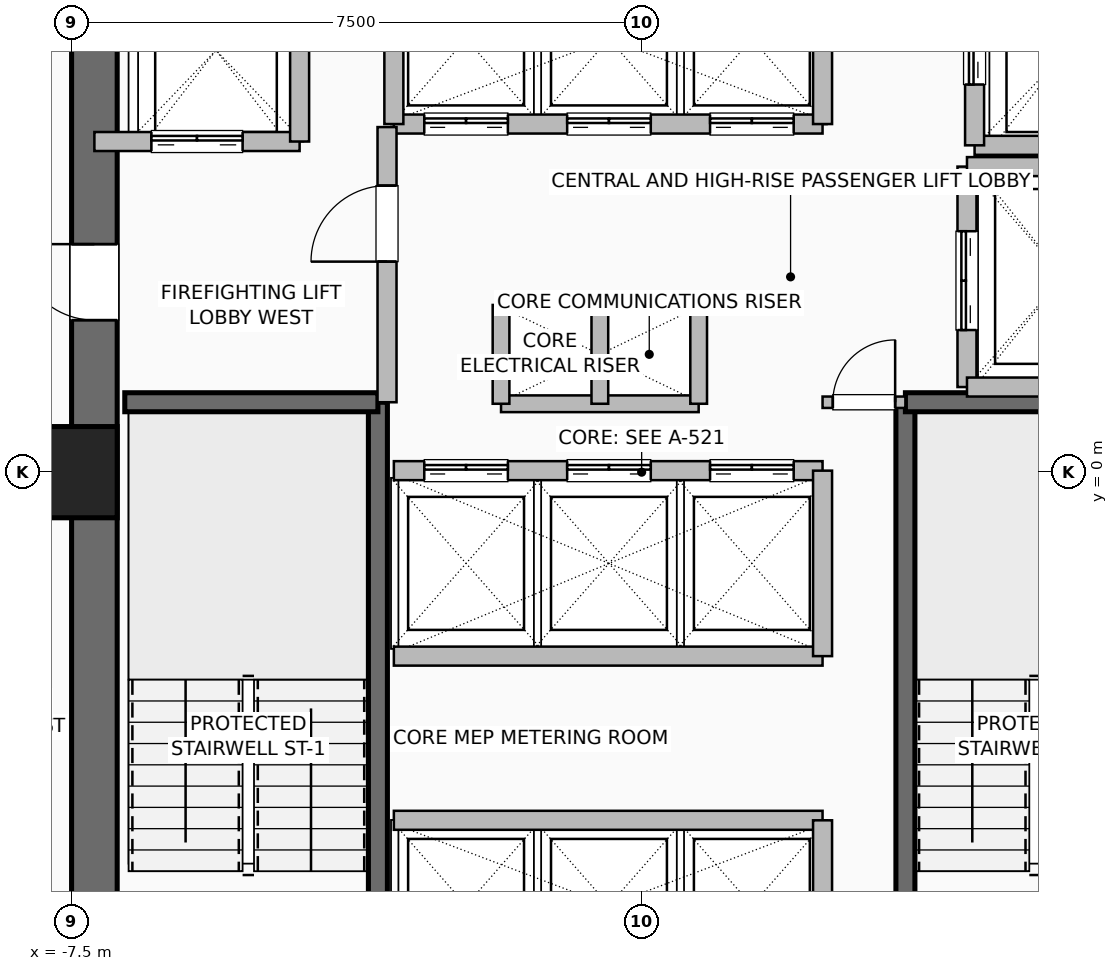
"""IFC4 building model, lengths in metres.
Left out: names, types, materials, properties, quantities, classifications, styles, units other than length and angle.
Written with IfcOpenShell. Run it as: python <this file> out.ifc"""

import sys

from ifc_helpers import new_model, si_unit, direction, frame, frame_2d, origin, origin_2d, place, context, subcontext, project, spatial, rectangle, hollow_rectangle, extrude, element, fill, save


model = new_model("IFC4")
c1 = context("Model", 3, precision=1e-05, world=origin(), true_north=direction((0.0, 1.0)))
c2 = subcontext(c1, "Body", "Model", "MODEL_VIEW")
j1 = project(units=[si_unit("LENGTHUNIT", "METRE"), si_unit("PLANEANGLEUNIT", "RADIAN")], contexts=[c1])
p1 = place(None, origin())
s1 = spatial("IfcSite", under=j1, at=p1, CompositionType="ELEMENT")
p2 = place(p1, origin())
s2 = spatial("IfcBuilding", under=s1, at=p2, CompositionType="ELEMENT")
p3 = place(p2, frame((0.0, 0.0, 79.5)))
s3 = spatial("IfcBuildingStorey", under=s2, at=p3, CompositionType="ELEMENT", Elevation=79.5)
p4 = place(p3, frame((-7.5, 0.0, 0.0), z_axis=(0.0, 0.0, 1.0), x_axis=(1.0, 0.0, 0.0)))
e1 = element("IfcColumn", 1, at=p4, inside=s3, PredefinedType="COLUMN", context=c2, shape_type="SweptSolid", body=[
    extrude(hollow_rectangle(XDim=1.2, YDim=1.2, WallThickness=0.055, at=origin_2d()), origin(), (0.0, 0.0, 1.0), 3.5),
])
p5 = place(p3, frame((-7.2, -7.5, 0.0), z_axis=(0.0, 0.0, 1.0), x_axis=(0.0, 1.0, 0.0)))
e2 = element("IfcWall", 2, at=p5, inside=s3, PredefinedType="SHEAR", context=c2, shape_type="SweptSolid", body=[
    extrude(rectangle(XDim=15.0, YDim=0.6, at=frame_2d((7.5, 0.0))), origin(), (0.0, 0.0, 1.0), 3.15),
])
p6 = place(p5, frame((9.5, 0.0, 0.0)))
e3 = element("IfcOpeningElement", 3, at=p6, cuts=e2, PredefinedType="OPENING", context=c2, shape_type="SweptSolid", body=[
    extrude(rectangle(XDim=1.0, YDim=2.08, at=frame_2d((0.5, 1.04))), frame((0.0, 0.31, 0.0), z_axis=(0.0, -1.0, 0.0), x_axis=(1.0, 0.0, 0.0)), (0.0, 0.0, 1.0), 0.62),
])
p7 = place(p3, frame((-3.47, -6.8, 0.0), z_axis=(0.0, 0.0, 1.0), x_axis=(0.0, 1.0, 0.0)))
e4 = element("IfcWall", 4, at=p7, inside=s3, PredefinedType="SHEAR", context=c2, shape_type="SweptSolid", body=[
    extrude(rectangle(XDim=7.72, YDim=0.25, at=frame_2d((3.86, 0.0))), origin(), (0.0, 0.0, 1.0), 3.15),
])
p8 = place(p3, frame((-6.8, 0.92, 0.0), z_axis=(0.0, 0.0, 1.0), x_axis=(1.0, 0.0, 0.0)))
e5 = element("IfcWall", 5, at=p8, inside=s3, PredefinedType="SHEAR", context=c2, shape_type="SweptSolid", body=[
    extrude(rectangle(XDim=3.33, YDim=0.25, at=frame_2d((1.665, 0.0))), origin(), (0.0, 0.0, 1.0), 3.15),
])
p9 = place(p3, frame((3.47, -6.8, 0.0), z_axis=(0.0, 0.0, 1.0), x_axis=(0.0, 1.0, 0.0)))
e6 = element("IfcWall", 6, at=p9, inside=s3, PredefinedType="SHEAR", context=c2, shape_type="SweptSolid", body=[
    extrude(rectangle(XDim=7.72, YDim=0.25, at=frame_2d((3.86, 0.0))), origin(), (0.0, 0.0, 1.0), 3.15),
])
p10 = place(p3, frame((3.47, 0.92, 0.0), z_axis=(0.0, 0.0, 1.0), x_axis=(1.0, 0.0, 0.0)))
e7 = element("IfcWall", 7, at=p10, inside=s3, PredefinedType="SHEAR", context=c2, shape_type="SweptSolid", body=[
    extrude(rectangle(XDim=3.33, YDim=0.25, at=frame_2d((1.665, 0.0))), origin(), (0.0, 0.0, 1.0), 3.15),
])
for number, where, z_axis, x_axis in (
    (8, (-1.85, 2.2, 0.0), (0.0, 0.0, 1.0), (1.0, 0.0, 0.0)),
    (9, (-1.85, 0.9, 0.0), (0.0, 0.0, 1.0), (1.0, 0.0, 0.0)),
):
    element("IfcWall", number, at=place(p3, frame(where, z_axis=z_axis, x_axis=x_axis)), inside=s3, PredefinedType="PARTITIONING", context=c2, shape_type="SweptSolid", body=[
        extrude(rectangle(XDim=2.6, YDim=0.22, at=frame_2d((1.3, 0.0))), origin(), (0.0, 0.0, 1.0), 3.15),
    ])
for number, where, z_axis, x_axis in (
    (10, (-0.55, 0.9, 0.0), (0.0, 0.0, 1.0), (0.0, 1.0, 0.0)),
    (11, (0.75, 0.9, 0.0), (0.0, 0.0, 1.0), (0.0, 1.0, 0.0)),
    (12, (-1.85, 0.9, 0.0), (0.0, 0.0, 1.0), (0.0, 1.0, 0.0)),
):
    element("IfcWall", number, at=place(p3, frame(where, z_axis=z_axis, x_axis=x_axis)), inside=s3, PredefinedType="PARTITIONING", context=c2, shape_type="SweptSolid", body=[
        extrude(rectangle(XDim=1.3, YDim=0.22, at=frame_2d((0.65, 0.0))), origin(), (0.0, 0.0, 1.0), 3.15),
    ])
p11 = place(p3, frame((-3.26, -4.58, 0.0), z_axis=(0.0, 0.0, 1.0), x_axis=(1.0, 0.0, 0.0)))
e13 = element("IfcWall", 13, at=p11, inside=s3, PredefinedType="SHEAR", context=c2, shape_type="SweptSolid", body=[
    extrude(rectangle(XDim=5.64, YDim=0.25, at=frame_2d((2.82, 0.0))), origin(), (0.0, 0.0, 1.0), 3.15),
])
p12 = place(p3, frame((2.38, -6.8, 0.0), z_axis=(0.0, 0.0, 1.0), x_axis=(0.0, 1.0, 0.0)))
e14 = element("IfcWall", 14, at=p12, inside=s3, PredefinedType="SHEAR", context=c2, shape_type="SweptSolid", body=[
    extrude(rectangle(XDim=2.22, YDim=0.25, at=frame_2d((1.11, 0.0))), origin(), (0.0, 0.0, 1.0), 3.15),
])
p13 = place(p3, frame((-3.26, 0.02, 0.0), z_axis=(0.0, 0.0, 1.0), x_axis=(1.0, 0.0, 0.0)))
e15 = element("IfcWall", 15, at=p13, inside=s3, PredefinedType="SHEAR", context=c2, shape_type="SweptSolid", body=[
    extrude(rectangle(XDim=5.64, YDim=0.25, at=frame_2d((2.82, 0.0))), origin(), (0.0, 0.0, 1.0), 3.15),
])
p14 = place(p13, frame((0.4, 0.0, 0.0)))
e16 = element("IfcOpeningElement", 16, at=p14, cuts=e15, PredefinedType="OPENING", context=c2, shape_type="SweptSolid", body=[
    extrude(rectangle(XDim=1.1, YDim=2.2, at=frame_2d((0.55, 1.1))), frame((0.0, 0.135, 0.0), z_axis=(0.0, -1.0, 0.0), x_axis=(1.0, 0.0, 0.0)), (0.0, 0.0, 1.0), 0.27),
])
p15 = place(p13, frame((2.28, 0.0, 0.0)))
e17 = element("IfcOpeningElement", 17, at=p15, cuts=e15, PredefinedType="OPENING", context=c2, shape_type="SweptSolid", body=[
    extrude(rectangle(XDim=1.1, YDim=2.2, at=frame_2d((0.55, 1.1))), frame((0.0, 0.135, 0.0), z_axis=(0.0, -1.0, 0.0), x_axis=(1.0, 0.0, 0.0)), (0.0, 0.0, 1.0), 0.27),
])
p16 = place(p13, frame((4.16, 0.0, 0.0)))
e18 = element("IfcOpeningElement", 18, at=p16, cuts=e15, PredefinedType="OPENING", context=c2, shape_type="SweptSolid", body=[
    extrude(rectangle(XDim=1.1, YDim=2.2, at=frame_2d((0.55, 1.1))), frame((0.0, 0.135, 0.0), z_axis=(0.0, -1.0, 0.0), x_axis=(1.0, 0.0, 0.0)), (0.0, 0.0, 1.0), 0.27),
])
p17 = place(p3, frame((-3.26, -2.42, 0.0), z_axis=(0.0, 0.0, 1.0), x_axis=(1.0, 0.0, 0.0)))
e19 = element("IfcWall", 19, at=p17, inside=s3, PredefinedType="SHEAR", context=c2, shape_type="SweptSolid", body=[
    extrude(rectangle(XDim=5.64, YDim=0.25, at=frame_2d((2.82, 0.0))), origin(), (0.0, 0.0, 1.0), 3.15),
])
p18 = place(p3, frame((2.38, -2.42, 0.0), z_axis=(0.0, 0.0, 1.0), x_axis=(0.0, 1.0, 0.0)))
e20 = element("IfcWall", 20, at=p18, inside=s3, PredefinedType="SHEAR", context=c2, shape_type="SweptSolid", body=[
    extrude(rectangle(XDim=2.44, YDim=0.25, at=frame_2d((1.22, 0.0))), origin(), (0.0, 0.0, 1.0), 3.15),
])
p19 = place(p3, frame((-3.26, 4.58, 0.0), z_axis=(0.0, 0.0, 1.0), x_axis=(1.0, 0.0, 0.0)))
e21 = element("IfcWall", 21, at=p19, inside=s3, PredefinedType="SHEAR", context=c2, shape_type="SweptSolid", body=[
    extrude(rectangle(XDim=5.64, YDim=0.25, at=frame_2d((2.82, 0.0))), origin(), (0.0, 0.0, 1.0), 3.15),
])
p20 = place(p19, frame((0.4, 0.0, 0.0)))
e22 = element("IfcOpeningElement", 22, at=p20, cuts=e21, PredefinedType="OPENING", context=c2, shape_type="SweptSolid", body=[
    extrude(rectangle(XDim=1.1, YDim=2.2, at=frame_2d((0.55, 1.1))), frame((0.0, 0.135, 0.0), z_axis=(0.0, -1.0, 0.0), x_axis=(1.0, 0.0, 0.0)), (0.0, 0.0, 1.0), 0.27),
])
p21 = place(p19, frame((2.28, 0.0, 0.0)))
e23 = element("IfcOpeningElement", 23, at=p21, cuts=e21, PredefinedType="OPENING", context=c2, shape_type="SweptSolid", body=[
    extrude(rectangle(XDim=1.1, YDim=2.2, at=frame_2d((0.55, 1.1))), frame((0.0, 0.135, 0.0), z_axis=(0.0, -1.0, 0.0), x_axis=(1.0, 0.0, 0.0)), (0.0, 0.0, 1.0), 0.27),
])
p22 = place(p19, frame((4.16, 0.0, 0.0)))
e24 = element("IfcOpeningElement", 24, at=p22, cuts=e21, PredefinedType="OPENING", context=c2, shape_type="SweptSolid", body=[
    extrude(rectangle(XDim=1.1, YDim=2.2, at=frame_2d((0.55, 1.1))), frame((0.0, 0.135, 0.0), z_axis=(0.0, -1.0, 0.0), x_axis=(1.0, 0.0, 0.0)), (0.0, 0.0, 1.0), 0.27),
])
for number, where, z_axis, x_axis in (
    (25, (-3.26, 4.58, 0.0), (0.0, 0.0, 1.0), (0.0, 1.0, 0.0)),
    (26, (2.38, 4.58, 0.0), (0.0, 0.0, 1.0), (0.0, 1.0, 0.0)),
):
    element("IfcWall", number, at=place(p3, frame(where, z_axis=z_axis, x_axis=x_axis)), inside=s3, PredefinedType="SHEAR", context=c2, shape_type="SweptSolid", body=[
        extrude(rectangle(XDim=2.22, YDim=0.25, at=frame_2d((1.11, 0.0))), origin(), (0.0, 0.0, 1.0), 3.15),
    ])
p23 = place(p3, frame((-7.2, 4.35, 0.0), z_axis=(0.0, 0.0, 1.0), x_axis=(1.0, 0.0, 0.0)))
e27 = element("IfcWall", 27, at=p23, inside=s3, PredefinedType="SHEAR", context=c2, shape_type="SweptSolid", body=[
    extrude(rectangle(XDim=2.7, YDim=0.25, at=frame_2d((1.35, 0.0))), origin(), (0.0, 0.0, 1.0), 3.15),
])
p24 = place(p23, frame((0.75, 0.0, 0.0)))
e28 = element("IfcOpeningElement", 28, at=p24, cuts=e27, PredefinedType="OPENING", context=c2, shape_type="SweptSolid", body=[
    extrude(rectangle(XDim=1.2, YDim=2.2, at=frame_2d((0.6, 1.1))), frame((0.0, 0.135, 0.0), z_axis=(0.0, -1.0, 0.0), x_axis=(1.0, 0.0, 0.0)), (0.0, 0.0, 1.0), 0.27),
])
p25 = place(p3, frame((-4.5, 4.35, 0.0), z_axis=(0.0, 0.0, 1.0), x_axis=(0.0, 1.0, 0.0)))
e29 = element("IfcWall", 29, at=p25, inside=s3, PredefinedType="SHEAR", context=c2, shape_type="SweptSolid", body=[
    extrude(rectangle(XDim=2.85, YDim=0.25, at=frame_2d((1.425, 0.0))), origin(), (0.0, 0.0, 1.0), 3.15),
])
p26 = place(p3, frame((4.38, 4.3, 0.0), z_axis=(0.0, 0.0, 1.0), x_axis=(1.0, 0.0, 0.0)))
e30 = element("IfcWall", 30, at=p26, inside=s3, PredefinedType="SHEAR", context=c2, shape_type="SweptSolid", body=[
    extrude(rectangle(XDim=2.42, YDim=0.25, at=frame_2d((1.21, 0.0))), origin(), (0.0, 0.0, 1.0), 3.15),
])
p27 = place(p3, frame((4.38, 4.3, 0.0), z_axis=(0.0, 0.0, 1.0), x_axis=(0.0, 1.0, 0.0)))
e31 = element("IfcWall", 31, at=p27, inside=s3, PredefinedType="SHEAR", context=c2, shape_type="SweptSolid", body=[
    extrude(rectangle(XDim=2.5, YDim=0.25, at=frame_2d((1.25, 0.0))), origin(), (0.0, 0.0, 1.0), 3.15),
])
p28 = place(p27, frame((0.8, 0.0, 0.0)))
e32 = element("IfcOpeningElement", 32, at=p28, cuts=e31, PredefinedType="OPENING", context=c2, shape_type="SweptSolid", body=[
    extrude(rectangle(XDim=1.2, YDim=2.2, at=frame_2d((0.6, 1.1))), frame((0.0, 0.135, 0.0), z_axis=(0.0, -1.0, 0.0), x_axis=(1.0, 0.0, 0.0)), (0.0, 0.0, 1.0), 0.27),
])
p29 = place(p3, frame((4.28, 1.12, 0.0), z_axis=(0.0, 0.0, 1.0), x_axis=(0.0, 1.0, 0.0)))
e33 = element("IfcWall", 33, at=p29, inside=s3, PredefinedType="SHEAR", context=c2, shape_type="SweptSolid", body=[
    extrude(rectangle(XDim=2.9, YDim=0.25, at=frame_2d((1.45, 0.0))), origin(), (0.0, 0.0, 1.0), 3.15),
])
p30 = place(p29, frame((0.75, 0.0, 0.0)))
e34 = element("IfcOpeningElement", 34, at=p30, cuts=e33, PredefinedType="OPENING", context=c2, shape_type="SweptSolid", body=[
    extrude(rectangle(XDim=1.3, YDim=2.3, at=frame_2d((0.65, 1.15))), frame((0.0, 0.135, 0.0), z_axis=(0.0, -1.0, 0.0), x_axis=(1.0, 0.0, 0.0)), (0.0, 0.0, 1.0), 0.27),
])
for number, where, z_axis, x_axis in (
    (35, (4.28, 1.12, 0.0), (0.0, 0.0, 1.0), (1.0, 0.0, 0.0)),
    (36, (4.28, 4.02, 0.0), (0.0, 0.0, 1.0), (1.0, 0.0, 0.0)),
):
    element("IfcWall", number, at=place(p3, frame(where, z_axis=z_axis, x_axis=x_axis)), inside=s3, PredefinedType="SHEAR", context=c2, shape_type="SweptSolid", body=[
        extrude(rectangle(XDim=2.52, YDim=0.25, at=frame_2d((1.26, 0.0))), origin(), (0.0, 0.0, 1.0), 3.15),
    ])
p31 = place(p3, frame((-3.35, 0.92, 0.0), z_axis=(0.0, 0.0, 1.0), x_axis=(0.0, 1.0, 0.0)))
e37 = element("IfcWall", 37, at=p31, inside=s3, PredefinedType="SHEAR", context=c2, shape_type="SweptSolid", body=[
    extrude(rectangle(XDim=3.62, YDim=0.25, at=frame_2d((1.81, 0.0))), origin(), (0.0, 0.0, 1.0), 3.15),
])
p32 = place(p31, frame((1.85, 0.0, 0.0)))
e38 = element("IfcOpeningElement", 38, at=p32, cuts=e37, PredefinedType="OPENING", context=c2, shape_type="SweptSolid", body=[
    extrude(rectangle(XDim=1.0, YDim=2.08, at=frame_2d((0.5, 1.04))), frame((0.0, 0.135, 0.0), z_axis=(0.0, -1.0, 0.0), x_axis=(1.0, 0.0, 0.0)), (0.0, 0.0, 1.0), 0.27),
])
p33 = place(p3, frame((2.38, 0.92, 0.0), z_axis=(0.0, 0.0, 1.0), x_axis=(1.0, 0.0, 0.0)))
e39 = element("IfcWall", 39, at=p33, inside=s3, PredefinedType="PARTITIONING", context=c2, shape_type="SweptSolid", body=[
    extrude(rectangle(XDim=1.09, YDim=0.15, at=frame_2d((0.545, 0.0))), origin(), (0.0, 0.0, 1.0), 3.15),
])
p34 = place(p33, frame((0.135, 0.0, 0.0)))
e40 = element("IfcOpeningElement", 40, at=p34, cuts=e39, PredefinedType="OPENING", context=c2, shape_type="SweptSolid", body=[
    extrude(rectangle(XDim=0.82, YDim=2.05, at=frame_2d((0.41, 1.025))), frame((0.0, 0.085, 0.0), z_axis=(0.0, -1.0, 0.0), x_axis=(1.0, 0.0, 0.0)), (0.0, 0.0, 1.0), 0.17),
])
p35 = place(p6, origin())
e41 = element("IfcDoor", 41, at=p35, inside=s3, OperationType="SINGLE_SWING_RIGHT", PredefinedType="DOOR", context=c2, shape_type="SweptSolid", body=[
    extrude(rectangle(XDim=1.0, YDim=2.08, at=frame_2d((0.5, 1.04))), frame((0.0, 0.025, 0.0), z_axis=(0.0, -1.0, 0.0), x_axis=(1.0, 0.0, 0.0)), (0.0, 0.0, 1.0), 0.05),
])
fill(e3, e41)
p36 = place(p14, origin())
e42 = element("IfcDoor", 42, at=p36, inside=s3, OperationType="DOUBLE_DOOR_SLIDING", PredefinedType="DOOR", context=c2, shape_type="SweptSolid", body=[
    extrude(rectangle(XDim=1.1, YDim=2.2, at=frame_2d((0.55, 1.1))), frame((0.0, 0.025, 0.0), z_axis=(0.0, -1.0, 0.0), x_axis=(1.0, 0.0, 0.0)), (0.0, 0.0, 1.0), 0.05),
])
fill(e16, e42)
p37 = place(p15, origin())
e43 = element("IfcDoor", 43, at=p37, inside=s3, OperationType="DOUBLE_DOOR_SLIDING", PredefinedType="DOOR", context=c2, shape_type="SweptSolid", body=[
    extrude(rectangle(XDim=1.1, YDim=2.2, at=frame_2d((0.55, 1.1))), frame((0.0, 0.025, 0.0), z_axis=(0.0, -1.0, 0.0), x_axis=(1.0, 0.0, 0.0)), (0.0, 0.0, 1.0), 0.05),
])
fill(e17, e43)
p38 = place(p16, origin())
e44 = element("IfcDoor", 44, at=p38, inside=s3, OperationType="DOUBLE_DOOR_SLIDING", PredefinedType="DOOR", context=c2, shape_type="SweptSolid", body=[
    extrude(rectangle(XDim=1.1, YDim=2.2, at=frame_2d((0.55, 1.1))), frame((0.0, 0.025, 0.0), z_axis=(0.0, -1.0, 0.0), x_axis=(1.0, 0.0, 0.0)), (0.0, 0.0, 1.0), 0.05),
])
fill(e18, e44)
p39 = place(p20, origin())
e45 = element("IfcDoor", 45, at=p39, inside=s3, OperationType="DOUBLE_DOOR_SLIDING", PredefinedType="DOOR", context=c2, shape_type="SweptSolid", body=[
    extrude(rectangle(XDim=1.1, YDim=2.2, at=frame_2d((0.55, 1.1))), frame((0.0, 0.025, 0.0), z_axis=(0.0, -1.0, 0.0), x_axis=(1.0, 0.0, 0.0)), (0.0, 0.0, 1.0), 0.05),
])
fill(e22, e45)
p40 = place(p21, origin())
e46 = element("IfcDoor", 46, at=p40, inside=s3, OperationType="DOUBLE_DOOR_SLIDING", PredefinedType="DOOR", context=c2, shape_type="SweptSolid", body=[
    extrude(rectangle(XDim=1.1, YDim=2.2, at=frame_2d((0.55, 1.1))), frame((0.0, 0.025, 0.0), z_axis=(0.0, -1.0, 0.0), x_axis=(1.0, 0.0, 0.0)), (0.0, 0.0, 1.0), 0.05),
])
fill(e23, e46)
p41 = place(p22, origin())
e47 = element("IfcDoor", 47, at=p41, inside=s3, OperationType="DOUBLE_DOOR_SLIDING", PredefinedType="DOOR", context=c2, shape_type="SweptSolid", body=[
    extrude(rectangle(XDim=1.1, YDim=2.2, at=frame_2d((0.55, 1.1))), frame((0.0, 0.025, 0.0), z_axis=(0.0, -1.0, 0.0), x_axis=(1.0, 0.0, 0.0)), (0.0, 0.0, 1.0), 0.05),
])
fill(e24, e47)
p42 = place(p24, origin())
e48 = element("IfcDoor", 48, at=p42, inside=s3, OperationType="DOUBLE_DOOR_SLIDING", PredefinedType="DOOR", context=c2, shape_type="SweptSolid", body=[
    extrude(rectangle(XDim=1.2, YDim=2.2, at=frame_2d((0.6, 1.1))), frame((0.0, 0.025, 0.0), z_axis=(0.0, -1.0, 0.0), x_axis=(1.0, 0.0, 0.0)), (0.0, 0.0, 1.0), 0.05),
])
fill(e28, e48)
p43 = place(p28, origin())
e49 = element("IfcDoor", 49, at=p43, inside=s3, OperationType="DOUBLE_DOOR_SLIDING", PredefinedType="DOOR", context=c2, shape_type="SweptSolid", body=[
    extrude(rectangle(XDim=1.2, YDim=2.2, at=frame_2d((0.6, 1.1))), frame((0.0, 0.025, 0.0), z_axis=(0.0, -1.0, 0.0), x_axis=(1.0, 0.0, 0.0)), (0.0, 0.0, 1.0), 0.05),
])
fill(e32, e49)
p44 = place(p30, origin())
e50 = element("IfcDoor", 50, at=p44, inside=s3, OperationType="DOUBLE_DOOR_SLIDING", PredefinedType="DOOR", context=c2, shape_type="SweptSolid", body=[
    extrude(rectangle(XDim=1.3, YDim=2.3, at=frame_2d((0.65, 1.15))), frame((0.0, 0.025, 0.0), z_axis=(0.0, -1.0, 0.0), x_axis=(1.0, 0.0, 0.0)), (0.0, 0.0, 1.0), 0.05),
])
fill(e34, e50)
p45 = place(p32, origin())
e51 = element("IfcDoor", 51, at=p45, inside=s3, OperationType="SINGLE_SWING_LEFT", PredefinedType="DOOR", context=c2, shape_type="SweptSolid", body=[
    extrude(rectangle(XDim=1.0, YDim=2.08, at=frame_2d((0.5, 1.04))), frame((0.0, 0.025, 0.0), z_axis=(0.0, -1.0, 0.0), x_axis=(1.0, 0.0, 0.0)), (0.0, 0.0, 1.0), 0.05),
])
fill(e38, e51)
p46 = place(p34, origin())
e52 = element("IfcDoor", 52, at=p46, inside=s3, OperationType="SINGLE_SWING_RIGHT", PredefinedType="DOOR", context=c2, shape_type="SweptSolid", body=[
    extrude(rectangle(XDim=0.82, YDim=2.05, at=frame_2d((0.41, 1.025))), frame((0.0, 0.025, 0.0), z_axis=(0.0, -1.0, 0.0), x_axis=(1.0, 0.0, 0.0)), (0.0, 0.0, 1.0), 0.05),
])
fill(e40, e52)
save(model, sys.argv[1])
